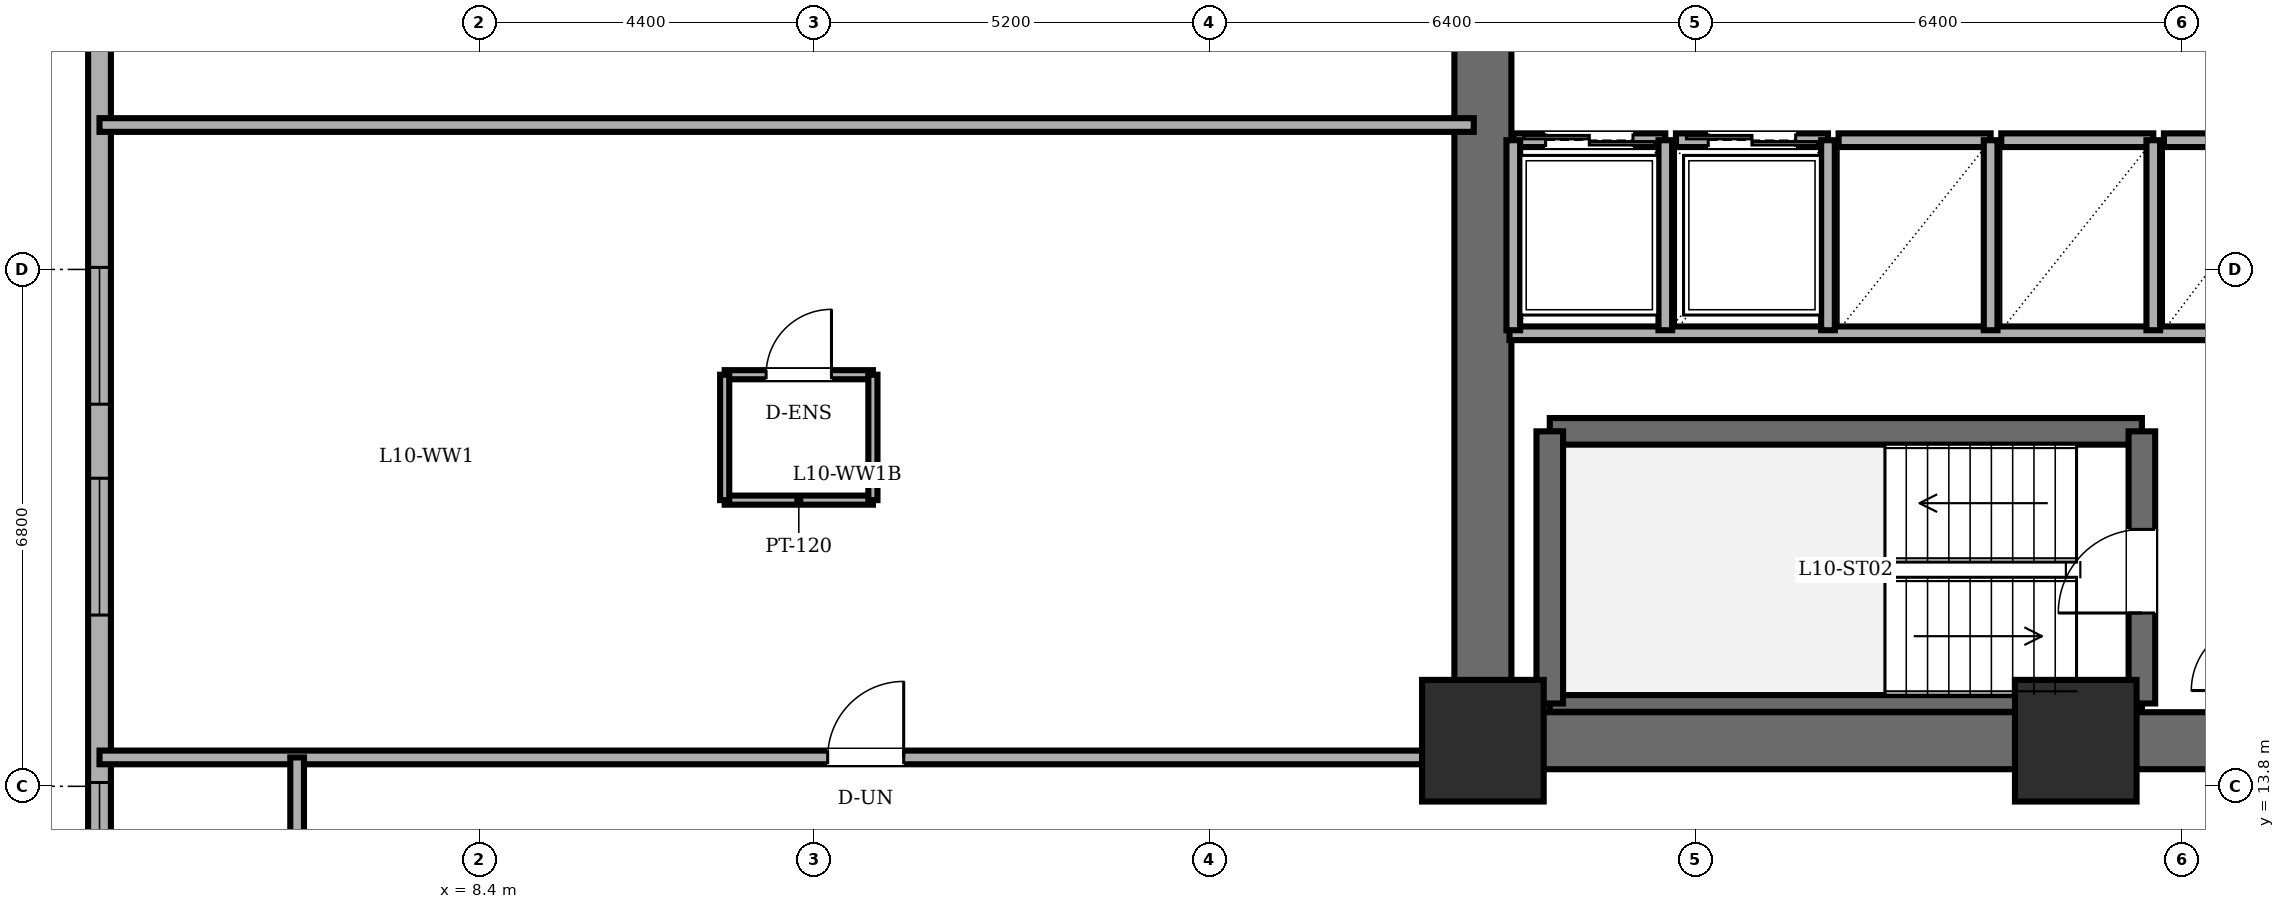
"""IFC4 building model, lengths in metres.
Left out: names, types, materials, properties, quantities, classifications, styles, units other than length and angle.
Written with IfcOpenShell. Run it as: python <this file> out.ifc"""

import sys

from ifc_helpers import new_model, si_unit, direction, frame, frame_2d, origin, origin_2d, place, context, subcontext, project, spatial, rectangle, extrude, element, fill, save


model = new_model("IFC4")
c1 = context("Model", 3, precision=1e-05, world=origin(), true_north=direction((0.0, 1.0)))
c2 = subcontext(c1, "Body", "Model", "MODEL_VIEW")
j1 = project(units=[si_unit("LENGTHUNIT", "METRE"), si_unit("PLANEANGLEUNIT", "RADIAN")], contexts=[c1])
p1 = place(None, origin())
s1 = spatial("IfcSite", under=j1, at=p1, CompositionType="ELEMENT")
p2 = place(p1, origin())
s2 = spatial("IfcBuilding", under=s1, at=p2, CompositionType="ELEMENT")
p3 = place(p2, frame((0.0, 0.0, 39.6)))
s3 = spatial("IfcBuildingStorey", under=s2, at=p3, CompositionType="ELEMENT", Elevation=39.6)
for number, where, z_axis, x_axis in (
    (1, (21.6, 14.4, 0.0), (0.0, 0.0, 1.0), (1.0, 0.0, 0.0)),
    (2, (29.4, 14.4, 0.0), (0.0, 0.0, 1.0), (1.0, 0.0, 0.0)),
):
    element("IfcColumn", number, at=place(p3, frame(where, z_axis=z_axis, x_axis=x_axis)), inside=s3, PredefinedType="COLUMN", context=c2, shape_type="SweptSolid", body=[
        extrude(rectangle(XDim=1.6, YDim=1.6, at=origin_2d()), origin(), (0.0, 0.0, 1.0), 3.6),
    ])
p4 = place(p3, frame((3.4, 40.2, 0.0), z_axis=(0.0, 0.0, 1.0), x_axis=(0.0, -1.0, 0.0)))
e3 = element("IfcWall", 3, at=p4, inside=s3, PredefinedType="SOLIDWALL", context=c2, shape_type="SweptSolid", body=[
    extrude(rectangle(XDim=32.4, YDim=0.3, at=frame_2d((16.2, 0.0))), origin(), (0.0, 0.0, 1.0), 3.4),
])
p5 = place(p4, frame((1.235, 0.0, 0.85)))
e4 = element("IfcOpeningElement", 4, at=p5, cuts=e3, PredefinedType="OPENING", context=c2, shape_type="SweptSolid", body=[
    extrude(rectangle(XDim=1.8, YDim=1.55, at=frame_2d((0.9, 0.775))), frame((0.0, 0.16, 0.0), z_axis=(0.0, -1.0, 0.0), x_axis=(1.0, 0.0, 0.0)), (0.0, 0.0, 1.0), 0.32),
])
p6 = place(p4, frame((4.25, 0.0, 0.85)))
e5 = element("IfcOpeningElement", 5, at=p6, cuts=e3, PredefinedType="OPENING", context=c2, shape_type="SweptSolid", body=[
    extrude(rectangle(XDim=1.8, YDim=1.55, at=frame_2d((0.9, 0.775))), frame((0.0, 0.16, 0.0), z_axis=(0.0, -1.0, 0.0), x_axis=(1.0, 0.0, 0.0)), (0.0, 0.0, 1.0), 0.32),
])
p7 = place(p4, frame((9.253, 0.0, 0.85)))
e6 = element("IfcOpeningElement", 6, at=p7, cuts=e3, PredefinedType="OPENING", context=c2, shape_type="SweptSolid", body=[
    extrude(rectangle(XDim=1.8, YDim=1.55, at=frame_2d((0.9, 0.775))), frame((0.0, 0.16, 0.0), z_axis=(0.0, -1.0, 0.0), x_axis=(1.0, 0.0, 0.0)), (0.0, 0.0, 1.0), 0.32),
])
p8 = place(p4, frame((13.027, 0.0, 0.85)))
e7 = element("IfcOpeningElement", 7, at=p8, cuts=e3, PredefinedType="OPENING", context=c2, shape_type="SweptSolid", body=[
    extrude(rectangle(XDim=1.8, YDim=1.55, at=frame_2d((0.9, 0.775))), frame((0.0, 0.16, 0.0), z_axis=(0.0, -1.0, 0.0), x_axis=(1.0, 0.0, 0.0)), (0.0, 0.0, 1.0), 0.32),
])
p9 = place(p4, frame((19.573, 0.0, 0.85)))
e8 = element("IfcOpeningElement", 8, at=p9, cuts=e3, PredefinedType="OPENING", context=c2, shape_type="SweptSolid", body=[
    extrude(rectangle(XDim=1.8, YDim=1.55, at=frame_2d((0.9, 0.775))), frame((0.0, 0.16, 0.0), z_axis=(0.0, -1.0, 0.0), x_axis=(1.0, 0.0, 0.0)), (0.0, 0.0, 1.0), 0.32),
])
p10 = place(p4, frame((22.347, 0.0, 0.85)))
e9 = element("IfcOpeningElement", 9, at=p10, cuts=e3, PredefinedType="OPENING", context=c2, shape_type="SweptSolid", body=[
    extrude(rectangle(XDim=1.8, YDim=1.55, at=frame_2d((0.9, 0.775))), frame((0.0, 0.16, 0.0), z_axis=(0.0, -1.0, 0.0), x_axis=(1.0, 0.0, 0.0)), (0.0, 0.0, 1.0), 0.32),
])
p11 = place(p4, frame((26.35, 0.0, 0.85)))
e10 = element("IfcOpeningElement", 10, at=p11, cuts=e3, PredefinedType="OPENING", context=c2, shape_type="SweptSolid", body=[
    extrude(rectangle(XDim=1.8, YDim=1.55, at=frame_2d((0.9, 0.775))), frame((0.0, 0.16, 0.0), z_axis=(0.0, -1.0, 0.0), x_axis=(1.0, 0.0, 0.0)), (0.0, 0.0, 1.0), 0.32),
])
p12 = place(p4, frame((29.365, 0.0, 0.85)))
e11 = element("IfcOpeningElement", 11, at=p12, cuts=e3, PredefinedType="OPENING", context=c2, shape_type="SweptSolid", body=[
    extrude(rectangle(XDim=1.8, YDim=1.55, at=frame_2d((0.9, 0.775))), frame((0.0, 0.16, 0.0), z_axis=(0.0, -1.0, 0.0), x_axis=(1.0, 0.0, 0.0)), (0.0, 0.0, 1.0), 0.32),
])
p13 = place(p3, frame((21.6, 14.4, 0.0), z_axis=(0.0, 0.0, 1.0), x_axis=(0.0, 1.0, 0.0)))
e12 = element("IfcWall", 12, at=p13, inside=s3, PredefinedType="SHEAR", context=c2, shape_type="SweptSolid", body=[
    extrude(rectangle(XDim=19.2, YDim=0.75, at=frame_2d((9.6, 0.0))), origin(), (0.0, 0.0, 1.0), 3.4),
])
p14 = place(p3, frame((37.2, 14.4, 0.0), z_axis=(0.0, 0.0, 1.0), x_axis=(-1.0, 0.0, 0.0)))
e13 = element("IfcWall", 13, at=p14, inside=s3, PredefinedType="SHEAR", context=c2, shape_type="SweptSolid", body=[
    extrude(rectangle(XDim=15.6, YDim=0.75, at=frame_2d((7.8, 0.0))), origin(), (0.0, 0.0, 1.0), 3.4),
])
p15 = place(p3, frame((22.48, 18.47, 0.0), z_axis=(0.0, 0.0, 1.0), x_axis=(1.0, 0.0, 0.0)))
e14 = element("IfcWall", 14, at=p15, inside=s3, PredefinedType="SOLIDWALL", context=c2, shape_type="SweptSolid", body=[
    extrude(rectangle(XDim=7.79, YDim=0.35, at=frame_2d((3.895, 0.0))), origin(), (0.0, 0.0, 1.0), 3.4),
])
p16 = place(p3, frame((22.48, 14.89, 0.0), z_axis=(0.0, 0.0, 1.0), x_axis=(1.0, 0.0, 0.0)))
e15 = element("IfcWall", 15, at=p16, inside=s3, PredefinedType="PARTITIONING", context=c2, shape_type="SweptSolid", body=[
    extrude(rectangle(XDim=7.79, YDim=0.22, at=frame_2d((3.895, 0.0))), origin(), (0.0, 0.0, 1.0), 3.4),
])
p17 = place(p3, frame((22.48, 14.89, 0.0), z_axis=(0.0, 0.0, 1.0), x_axis=(0.0, 1.0, 0.0)))
e16 = element("IfcWall", 16, at=p17, inside=s3, PredefinedType="SOLIDWALL", context=c2, shape_type="SweptSolid", body=[
    extrude(rectangle(XDim=3.58, YDim=0.35, at=frame_2d((1.79, 0.0))), origin(), (0.0, 0.0, 1.0), 3.4),
])
p18 = place(p3, frame((30.27, 14.89, 0.0), z_axis=(0.0, 0.0, 1.0), x_axis=(0.0, 1.0, 0.0)))
e17 = element("IfcWall", 17, at=p18, inside=s3, PredefinedType="SOLIDWALL", context=c2, shape_type="SweptSolid", body=[
    extrude(rectangle(XDim=3.58, YDim=0.35, at=frame_2d((1.79, 0.0))), origin(), (0.0, 0.0, 1.0), 3.4),
])
p19 = place(p18, frame((1.19, 0.0, 0.0)))
e18 = element("IfcOpeningElement", 18, at=p19, cuts=e17, PredefinedType="OPENING", context=c2, shape_type="SweptSolid", body=[
    extrude(rectangle(XDim=1.1, YDim=2.15, at=frame_2d((0.55, 1.075))), frame((0.0, 0.185, 0.0), z_axis=(0.0, -1.0, 0.0), x_axis=(1.0, 0.0, 0.0)), (0.0, 0.0, 1.0), 0.37),
])
p20 = place(p3, frame((21.95, 19.76, 0.0), z_axis=(0.0, 0.0, 1.0), x_axis=(1.0, 0.0, 0.0)))
e19 = element("IfcWall", 19, at=p20, inside=s3, PredefinedType="PARTITIONING", context=c2, shape_type="SweptSolid", body=[
    extrude(rectangle(XDim=14.87, YDim=0.18, at=frame_2d((7.435, 0.0))), origin(), (0.0, 0.0, 1.0), 3.4),
])
p21 = place(p3, frame((22.0, 22.3, 0.0), z_axis=(0.0, 0.0, 1.0), x_axis=(1.0, 0.0, 0.0)))
e20 = element("IfcWall", 20, at=p21, inside=s3, PredefinedType="PARTITIONING", context=c2, shape_type="SweptSolid", body=[
    extrude(rectangle(XDim=2.0, YDim=0.18, at=frame_2d((1.0, 0.0))), origin(), (0.0, 0.0, 1.0), 3.4),
])
p22 = place(p21, frame((0.425, 0.0, 0.0)))
e21 = element("IfcOpeningElement", 21, at=p22, cuts=e20, PredefinedType="OPENING", context=c2, shape_type="SweptSolid", body=[
    extrude(rectangle(XDim=1.15, YDim=2.2, at=frame_2d((0.575, 1.1))), frame((0.0, 0.1, 0.0), z_axis=(0.0, -1.0, 0.0), x_axis=(1.0, 0.0, 0.0)), (0.0, 0.0, 1.0), 0.2),
])
for number, where, z_axis, x_axis in (
    (22, (24.0, 19.8, 0.0), (0.0, 0.0, 1.0), (0.0, 1.0, 0.0)),
    (23, (22.0, 22.3, 0.0), (0.0, 0.0, 1.0), (0.0, -1.0, 0.0)),
):
    element("IfcWall", number, at=place(p3, frame(where, z_axis=z_axis, x_axis=x_axis)), inside=s3, PredefinedType="PARTITIONING", context=c2, shape_type="SweptSolid", body=[
        extrude(rectangle(XDim=2.5, YDim=0.18, at=frame_2d((1.25, 0.0))), origin(), (0.0, 0.0, 1.0), 3.4),
    ])
p23 = place(p3, frame((24.14, 22.3, 0.0), z_axis=(0.0, 0.0, 1.0), x_axis=(1.0, 0.0, 0.0)))
e24 = element("IfcWall", 24, at=p23, inside=s3, PredefinedType="PARTITIONING", context=c2, shape_type="SweptSolid", body=[
    extrude(rectangle(XDim=2.0, YDim=0.18, at=frame_2d((1.0, 0.0))), origin(), (0.0, 0.0, 1.0), 3.4),
])
p24 = place(p23, frame((0.425, 0.0, 0.0)))
e25 = element("IfcOpeningElement", 25, at=p24, cuts=e24, PredefinedType="OPENING", context=c2, shape_type="SweptSolid", body=[
    extrude(rectangle(XDim=1.15, YDim=2.2, at=frame_2d((0.575, 1.1))), frame((0.0, 0.1, 0.0), z_axis=(0.0, -1.0, 0.0), x_axis=(1.0, 0.0, 0.0)), (0.0, 0.0, 1.0), 0.2),
])
p25 = place(p3, frame((26.14, 19.8, 0.0), z_axis=(0.0, 0.0, 1.0), x_axis=(0.0, 1.0, 0.0)))
e26 = element("IfcWall", 26, at=p25, inside=s3, PredefinedType="PARTITIONING", context=c2, shape_type="SweptSolid", body=[
    extrude(rectangle(XDim=2.5, YDim=0.18, at=frame_2d((1.25, 0.0))), origin(), (0.0, 0.0, 1.0), 3.4),
])
p26 = place(p3, frame((26.28, 22.3, 0.0), z_axis=(0.0, 0.0, 1.0), x_axis=(1.0, 0.0, 0.0)))
e27 = element("IfcWall", 27, at=p26, inside=s3, PredefinedType="PARTITIONING", context=c2, shape_type="SweptSolid", body=[
    extrude(rectangle(XDim=2.0, YDim=0.18, at=frame_2d((1.0, 0.0))), origin(), (0.0, 0.0, 1.0), 3.4),
])
p27 = place(p3, frame((28.28, 19.8, 0.0), z_axis=(0.0, 0.0, 1.0), x_axis=(0.0, 1.0, 0.0)))
e28 = element("IfcWall", 28, at=p27, inside=s3, PredefinedType="PARTITIONING", context=c2, shape_type="SweptSolid", body=[
    extrude(rectangle(XDim=2.5, YDim=0.18, at=frame_2d((1.25, 0.0))), origin(), (0.0, 0.0, 1.0), 3.4),
])
p28 = place(p3, frame((28.42, 22.3, 0.0), z_axis=(0.0, 0.0, 1.0), x_axis=(1.0, 0.0, 0.0)))
e29 = element("IfcWall", 29, at=p28, inside=s3, PredefinedType="PARTITIONING", context=c2, shape_type="SweptSolid", body=[
    extrude(rectangle(XDim=2.0, YDim=0.18, at=frame_2d((1.0, 0.0))), origin(), (0.0, 0.0, 1.0), 3.4),
])
p29 = place(p3, frame((30.42, 19.8, 0.0), z_axis=(0.0, 0.0, 1.0), x_axis=(0.0, 1.0, 0.0)))
e30 = element("IfcWall", 30, at=p29, inside=s3, PredefinedType="PARTITIONING", context=c2, shape_type="SweptSolid", body=[
    extrude(rectangle(XDim=2.5, YDim=0.18, at=frame_2d((1.25, 0.0))), origin(), (0.0, 0.0, 1.0), 3.4),
])
p30 = place(p3, frame((30.56, 22.3, 0.0), z_axis=(0.0, 0.0, 1.0), x_axis=(1.0, 0.0, 0.0)))
e31 = element("IfcWall", 31, at=p30, inside=s3, PredefinedType="PARTITIONING", context=c2, shape_type="SweptSolid", body=[
    extrude(rectangle(XDim=1.9, YDim=0.18, at=frame_2d((0.95, 0.0))), origin(), (0.0, 0.0, 1.0), 3.4),
])
p31 = place(p3, frame((11.625, 19.215, 0.0), z_axis=(0.0, 0.0, 1.0), x_axis=(1.0, 0.0, 0.0)))
e32 = element("IfcWall", 32, at=p31, inside=s3, PredefinedType="PARTITIONING", context=c2, shape_type="SweptSolid", body=[
    extrude(rectangle(XDim=1.95, YDim=0.12, at=frame_2d((0.975, 0.0))), origin(), (0.0, 0.0, 1.0), 3.4),
])
p32 = place(p31, frame((0.545, 0.0, 0.0)))
e33 = element("IfcOpeningElement", 33, at=p32, cuts=e32, PredefinedType="OPENING", context=c2, shape_type="SweptSolid", body=[
    extrude(rectangle(XDim=0.86, YDim=2.1, at=frame_2d((0.43, 1.05))), frame((0.0, 0.07, 0.0), z_axis=(0.0, -1.0, 0.0), x_axis=(1.0, 0.0, 0.0)), (0.0, 0.0, 1.0), 0.14),
])
p33 = place(p3, frame((13.575, 17.565, 0.0), z_axis=(0.0, 0.0, 1.0), x_axis=(-1.0, 0.0, 0.0)))
e34 = element("IfcWall", 34, at=p33, inside=s3, PredefinedType="PARTITIONING", context=c2, shape_type="SweptSolid", body=[
    extrude(rectangle(XDim=1.95, YDim=0.12, at=frame_2d((0.975, 0.0))), origin(), (0.0, 0.0, 1.0), 3.4),
])
for number, where, z_axis, x_axis in (
    (35, (11.625, 19.215, 0.0), (0.0, 0.0, 1.0), (0.0, -1.0, 0.0)),
    (36, (13.575, 17.565, 0.0), (0.0, 0.0, 1.0), (0.0, 1.0, 0.0)),
):
    element("IfcWall", number, at=place(p3, frame(where, z_axis=z_axis, x_axis=x_axis)), inside=s3, PredefinedType="PARTITIONING", context=c2, shape_type="SweptSolid", body=[
        extrude(rectangle(XDim=1.65, YDim=0.12, at=frame_2d((0.825, 0.0))), origin(), (0.0, 0.0, 1.0), 3.4),
    ])
p34 = place(p3, frame((3.4, 14.18, 0.0), z_axis=(0.0, 0.0, 1.0), x_axis=(1.0, 0.0, 0.0)))
e37 = element("IfcWall", 37, at=p34, inside=s3, PredefinedType="PARTITIONING", context=c2, shape_type="SweptSolid", body=[
    extrude(rectangle(XDim=18.08, YDim=0.18, at=frame_2d((9.04, 0.0))), origin(), (0.0, 0.0, 1.0), 3.4),
])
p35 = place(p34, frame((9.58, 0.0, 0.0)))
e38 = element("IfcOpeningElement", 38, at=p35, cuts=e37, PredefinedType="OPENING", context=c2, shape_type="SweptSolid", body=[
    extrude(rectangle(XDim=1.0, YDim=2.15, at=frame_2d((0.5, 1.075))), frame((0.0, 0.1, 0.0), z_axis=(0.0, -1.0, 0.0), x_axis=(1.0, 0.0, 0.0)), (0.0, 0.0, 1.0), 0.2),
])
p36 = place(p3, frame((3.4, 22.5, 0.0), z_axis=(0.0, 0.0, 1.0), x_axis=(1.0, 0.0, 0.0)))
e39 = element("IfcWall", 39, at=p36, inside=s3, PredefinedType="PARTITIONING", context=c2, shape_type="SweptSolid", body=[
    extrude(rectangle(XDim=18.08, YDim=0.18, at=frame_2d((9.04, 0.0))), origin(), (0.0, 0.0, 1.0), 3.4),
])
p37 = place(p3, frame((6.0, 11.72, 0.0), z_axis=(0.0, 0.0, 1.0), x_axis=(0.0, 1.0, 0.0)))
e40 = element("IfcWall", 40, at=p37, inside=s3, PredefinedType="PARTITIONING", context=c2, shape_type="SweptSolid", body=[
    extrude(rectangle(XDim=2.46, YDim=0.18, at=frame_2d((1.23, 0.0))), origin(), (0.0, 0.0, 1.0), 3.4),
])
p38 = place(p9, origin())
e41 = element("IfcWindow", 41, at=p38, inside=s3, PartitioningType="DOUBLE_PANEL_VERTICAL", PredefinedType="WINDOW", context=c2, shape_type="SweptSolid", body=[
    extrude(rectangle(XDim=1.8, YDim=1.55, at=frame_2d((0.9, 0.775))), frame((0.0, 0.03, 0.0), z_axis=(0.0, -1.0, 0.0), x_axis=(1.0, 0.0, 0.0)), (0.0, 0.0, 1.0), 0.06),
])
fill(e8, e41)
p39 = place(p10, origin())
e42 = element("IfcWindow", 42, at=p39, inside=s3, PartitioningType="DOUBLE_PANEL_VERTICAL", PredefinedType="WINDOW", context=c2, shape_type="SweptSolid", body=[
    extrude(rectangle(XDim=1.8, YDim=1.55, at=frame_2d((0.9, 0.775))), frame((0.0, 0.03, 0.0), z_axis=(0.0, -1.0, 0.0), x_axis=(1.0, 0.0, 0.0)), (0.0, 0.0, 1.0), 0.06),
])
fill(e9, e42)
p40 = place(p11, origin())
e43 = element("IfcWindow", 43, at=p40, inside=s3, PartitioningType="DOUBLE_PANEL_VERTICAL", PredefinedType="WINDOW", context=c2, shape_type="SweptSolid", body=[
    extrude(rectangle(XDim=1.8, YDim=1.55, at=frame_2d((0.9, 0.775))), frame((0.0, 0.03, 0.0), z_axis=(0.0, -1.0, 0.0), x_axis=(1.0, 0.0, 0.0)), (0.0, 0.0, 1.0), 0.06),
])
fill(e10, e43)
p41 = place(p19, origin())
e44 = element("IfcDoor", 44, at=p41, inside=s3, OperationType="SINGLE_SWING_LEFT", PredefinedType="DOOR", context=c2, shape_type="SweptSolid", body=[
    extrude(rectangle(XDim=1.1, YDim=2.15, at=frame_2d((0.55, 1.075))), frame((0.0, 0.025, 0.0), z_axis=(0.0, -1.0, 0.0), x_axis=(1.0, 0.0, 0.0)), (0.0, 0.0, 1.0), 0.05),
])
fill(e18, e44)
p42 = place(p22, origin())
e45 = element("IfcDoor", 45, at=p42, inside=s3, OperationType="DOUBLE_DOOR_SLIDING", PredefinedType="DOOR", context=c2, shape_type="SweptSolid", body=[
    extrude(rectangle(XDim=1.15, YDim=2.2, at=frame_2d((0.575, 1.1))), frame((0.0, 0.025, 0.0), z_axis=(0.0, -1.0, 0.0), x_axis=(1.0, 0.0, 0.0)), (0.0, 0.0, 1.0), 0.05),
])
fill(e21, e45)
p43 = place(p24, origin())
e46 = element("IfcDoor", 46, at=p43, inside=s3, OperationType="DOUBLE_DOOR_SLIDING", PredefinedType="DOOR", context=c2, shape_type="SweptSolid", body=[
    extrude(rectangle(XDim=1.15, YDim=2.2, at=frame_2d((0.575, 1.1))), frame((0.0, 0.025, 0.0), z_axis=(0.0, -1.0, 0.0), x_axis=(1.0, 0.0, 0.0)), (0.0, 0.0, 1.0), 0.05),
])
fill(e25, e46)
p44 = place(p32, origin())
e47 = element("IfcDoor", 47, at=p44, inside=s3, OperationType="SINGLE_SWING_RIGHT", PredefinedType="DOOR", context=c2, shape_type="SweptSolid", body=[
    extrude(rectangle(XDim=0.86, YDim=2.1, at=frame_2d((0.43, 1.05))), frame((0.0, 0.025, 0.0), z_axis=(0.0, -1.0, 0.0), x_axis=(1.0, 0.0, 0.0)), (0.0, 0.0, 1.0), 0.05),
])
fill(e33, e47)
p45 = place(p35, origin())
e48 = element("IfcDoor", 48, at=p45, inside=s3, OperationType="SINGLE_SWING_RIGHT", PredefinedType="DOOR", context=c2, shape_type="SweptSolid", body=[
    extrude(rectangle(XDim=1.0, YDim=2.15, at=frame_2d((0.5, 1.075))), frame((0.0, 0.025, 0.0), z_axis=(0.0, -1.0, 0.0), x_axis=(1.0, 0.0, 0.0)), (0.0, 0.0, 1.0), 0.05),
])
fill(e38, e48)
save(model, sys.argv[1])
